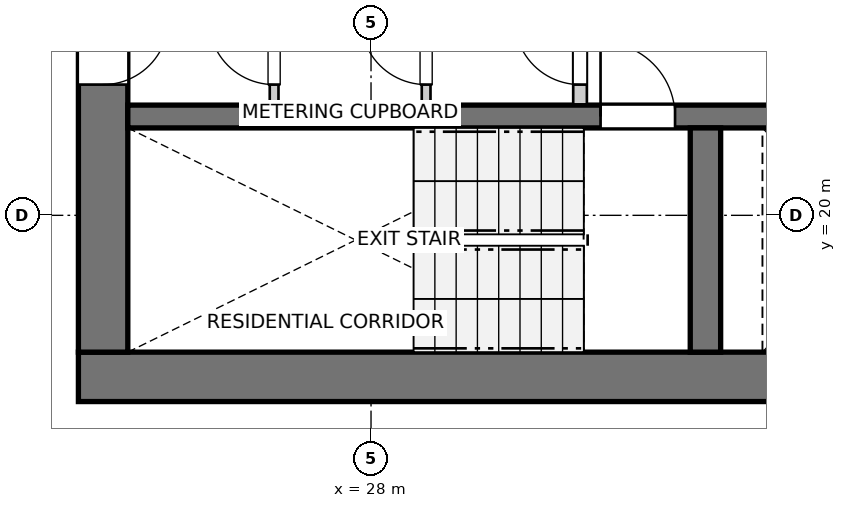
"""IFC4 building model, lengths in metres.
Left out: names, types, materials, properties, quantities, classifications, styles, units other than length and angle.
Written with IfcOpenShell. Run it as: python <this file> out.ifc"""

import sys

from ifc_helpers import new_model, si_unit, direction, frame, frame_2d, origin, place, context, subcontext, project, spatial, rectangle, extrude, source, transform, mapped, element, fill, save


model = new_model("IFC4")
c1 = context("Model", 3, precision=1e-05, world=origin(), true_north=direction((0.0, 1.0)))
c2 = subcontext(c1, "Body", "Model", "MODEL_VIEW")
j1 = project(units=[si_unit("LENGTHUNIT", "METRE"), si_unit("PLANEANGLEUNIT", "RADIAN")], contexts=[c1])
p1 = place(None, origin())
s1 = spatial("IfcSite", under=j1, at=p1, CompositionType="ELEMENT")
p2 = place(p1, origin())
s2 = spatial("IfcBuilding", under=s1, at=p2, CompositionType="ELEMENT")
p3 = place(p2, frame((0.0, 0.0, 92.8)))
s3 = spatial("IfcBuildingStorey", under=s2, at=p3, CompositionType="ELEMENT", Elevation=92.8)
p4 = place(p3, frame((24.15, 17.875, 0.0), z_axis=(0.0, 0.0, 1.0), x_axis=(1.0, 0.0, 0.0)))
e1 = element("IfcWall", 1, at=p4, inside=s3, PredefinedType="SHEAR", context=c2, shape_type="SweptSolid", body=[
    extrude(rectangle(XDim=12.4, YDim=0.65, at=frame_2d((6.2, 0.0))), origin(), (0.0, 0.0, 1.0), 2.95),
])
p5 = place(p3, frame((24.475, 33.8, 0.0), z_axis=(0.0, 0.0, 1.0), x_axis=(0.0, -1.0, 0.0)))
e2 = element("IfcWall", 2, at=p5, inside=s3, PredefinedType="SHEAR", context=c2, shape_type="SweptSolid", body=[
    extrude(rectangle(XDim=15.6, YDim=0.65, at=frame_2d((7.8, 0.0))), origin(), (0.0, 0.0, 1.0), 2.95),
])
p6 = place(p5, frame((7.05, 0.0, 0.0)))
e3 = element("IfcOpeningElement", 3, at=p6, cuts=e2, PredefinedType="OPENING", context=c2, shape_type="SweptSolid", body=[
    extrude(rectangle(XDim=1.5, YDim=2.15, at=frame_2d((0.75, 1.075))), frame((0.0, 0.335, 0.0), z_axis=(0.0, -1.0, 0.0), x_axis=(1.0, 0.0, 0.0)), (0.0, 0.0, 1.0), 0.67),
])
p7 = place(p5, frame((3.52, 0.0, 0.0)))
e4 = element("IfcOpeningElement", 4, at=p7, cuts=e2, PredefinedType="OPENING", context=c2, shape_type="SweptSolid", body=[
    extrude(rectangle(XDim=0.86, YDim=2.05, at=frame_2d((0.43, 1.025))), frame((0.0, 0.335, 0.0), z_axis=(0.0, -1.0, 0.0), x_axis=(1.0, 0.0, 0.0)), (0.0, 0.0, 1.0), 0.67),
])
p8 = place(p5, frame((11.22, 0.0, 0.0)))
e5 = element("IfcOpeningElement", 5, at=p8, cuts=e2, PredefinedType="OPENING", context=c2, shape_type="SweptSolid", body=[
    extrude(rectangle(XDim=0.86, YDim=2.05, at=frame_2d((0.43, 1.025))), frame((0.0, 0.335, 0.0), z_axis=(0.0, -1.0, 0.0), x_axis=(1.0, 0.0, 0.0)), (0.0, 0.0, 1.0), 0.67),
])
p9 = place(p3, frame((24.8, 21.3, 0.0), z_axis=(0.0, 0.0, 1.0), x_axis=(1.0, 0.0, 0.0)))
e6 = element("IfcWall", 6, at=p9, inside=s3, PredefinedType="SHEAR", context=c2, shape_type="SweptSolid", body=[
    extrude(rectangle(XDim=11.1, YDim=0.3, at=frame_2d((5.55, 0.0))), origin(), (0.0, 0.0, 1.0), 2.95),
])
p10 = place(p9, frame((6.22, 0.0, 0.0)))
e7 = element("IfcOpeningElement", 7, at=p10, cuts=e6, PredefinedType="OPENING", context=c2, shape_type="SweptSolid", body=[
    extrude(rectangle(XDim=0.98, YDim=2.15, at=frame_2d((0.49, 1.075))), frame((0.0, 0.16, 0.0), z_axis=(0.0, -1.0, 0.0), x_axis=(1.0, 0.0, 0.0)), (0.0, 0.0, 1.0), 0.32),
])
p11 = place(p9, frame((9.15, 0.0, 0.0)))
e8 = element("IfcOpeningElement", 8, at=p11, cuts=e6, PredefinedType="OPENING", context=c2, shape_type="SweptSolid", body=[
    extrude(rectangle(XDim=1.15, YDim=2.15, at=frame_2d((0.575, 1.075))), frame((0.0, 0.16, 0.0), z_axis=(0.0, -1.0, 0.0), x_axis=(1.0, 0.0, 0.0)), (0.0, 0.0, 1.0), 0.32),
])
p12 = place(p3, frame((32.4, 18.2, 0.0), z_axis=(0.0, 0.0, 1.0), x_axis=(0.0, 1.0, 0.0)))
e9 = element("IfcWall", 9, at=p12, inside=s3, PredefinedType="SHEAR", context=c2, shape_type="SweptSolid", body=[
    extrude(rectangle(XDim=2.95, YDim=0.4, at=frame_2d((1.475, 0.0))), origin(), (0.0, 0.0, 1.0), 2.95),
])
p13 = place(p3, frame((30.75, 21.46, 0.0), z_axis=(0.0, 0.0, 1.0), x_axis=(0.0, 1.0, 0.0)))
e10 = element("IfcWall", 10, at=p13, inside=s3, PredefinedType="PARTITIONING", context=c2, shape_type="SweptSolid", body=[
    extrude(rectangle(XDim=3.11, YDim=0.18, at=frame_2d((1.555, 0.0))), origin(), (0.0, 0.0, 1.0), 2.95),
])
p14 = place(p13, frame((0.26, 0.0, 0.0)))
e11 = element("IfcOpeningElement", 11, at=p14, cuts=e10, PredefinedType="OPENING", context=c2, shape_type="SweptSolid", body=[
    extrude(rectangle(XDim=0.86, YDim=2.05, at=frame_2d((0.43, 1.025))), frame((0.0, 0.1, 0.0), z_axis=(0.0, -1.0, 0.0), x_axis=(1.0, 0.0, 0.0)), (0.0, 0.0, 1.0), 0.2),
])
p15 = place(p3, frame((26.725, 21.46, 0.0), z_axis=(0.0, 0.0, 1.0), x_axis=(0.0, 1.0, 0.0)))
e12 = element("IfcWall", 12, at=p15, inside=s3, PredefinedType="PARTITIONING", context=c2, shape_type="SweptSolid", body=[
    extrude(rectangle(XDim=1.38, YDim=0.115, at=frame_2d((0.69, 0.0))), origin(), (0.0, 0.0, 1.0), 2.95),
])
p16 = place(p15, frame((0.26, 0.0, 0.0)))
e13 = element("IfcOpeningElement", 13, at=p16, cuts=e12, PredefinedType="OPENING", context=c2, shape_type="SweptSolid", body=[
    extrude(rectangle(XDim=0.86, YDim=2.05, at=frame_2d((0.43, 1.025))), frame((0.0, 0.067, 0.0), z_axis=(0.0, -1.0, 0.0), x_axis=(1.0, 0.0, 0.0)), (0.0, 0.0, 1.0), 0.135),
])
p17 = place(p3, frame((28.725, 21.46, 0.0), z_axis=(0.0, 0.0, 1.0), x_axis=(0.0, 1.0, 0.0)))
e14 = element("IfcWall", 14, at=p17, inside=s3, PredefinedType="PARTITIONING", context=c2, shape_type="SweptSolid", body=[
    extrude(rectangle(XDim=1.38, YDim=0.115, at=frame_2d((0.69, 0.0))), origin(), (0.0, 0.0, 1.0), 2.95),
])
p18 = place(p17, frame((0.26, 0.0, 0.0)))
e15 = element("IfcOpeningElement", 15, at=p18, cuts=e14, PredefinedType="OPENING", context=c2, shape_type="SweptSolid", body=[
    extrude(rectangle(XDim=0.86, YDim=2.05, at=frame_2d((0.43, 1.025))), frame((0.0, 0.067, 0.0), z_axis=(0.0, -1.0, 0.0), x_axis=(1.0, 0.0, 0.0)), (0.0, 0.0, 1.0), 0.135),
])
m1 = source(origin(), c2, "Body", "SweptSolid", [
    extrude(rectangle(XDim=0.98, YDim=2.15, at=frame_2d((0.49, 1.075))), frame((0.0, 0.025, 0.0), z_axis=(0.0, -1.0, 0.0), x_axis=(1.0, 0.0, 0.0)), (0.0, 0.0, 1.0), 0.05),
])
p19 = place(p10, origin())
e16 = element("IfcDoor", 16, at=p19, inside=s3, OperationType="SINGLE_SWING_LEFT", PredefinedType="DOOR", context=c2, shape_type="MappedRepresentation", body=[
    mapped(m1, transform((0.0, 0.0, 0.0), x_axis=(1.0, 0.0, 0.0), y_axis=(0.0, 1.0, 0.0), z_axis=(0.0, 0.0, 1.0), scale=1.0)),
])
fill(e7, e16)
m2 = source(origin(), c2, "Body", "SweptSolid", [
    extrude(rectangle(XDim=0.86, YDim=2.05, at=frame_2d((0.43, 1.025))), frame((0.0, 0.025, 0.0), z_axis=(0.0, -1.0, 0.0), x_axis=(1.0, 0.0, 0.0)), (0.0, 0.0, 1.0), 0.05),
])
p20 = place(p8, origin())
e17 = element("IfcDoor", 17, at=p20, inside=s3, OperationType="SINGLE_SWING_LEFT", PredefinedType="DOOR", context=c2, shape_type="MappedRepresentation", body=[
    mapped(m2, transform((0.0, 0.0, 0.0), x_axis=(1.0, 0.0, 0.0), y_axis=(0.0, 1.0, 0.0), z_axis=(0.0, 0.0, 1.0), scale=1.0)),
])
fill(e5, e17)
p21 = place(p14, origin())
e18 = element("IfcDoor", 18, at=p21, inside=s3, OperationType="SINGLE_SWING_RIGHT", PredefinedType="DOOR", context=c2, shape_type="MappedRepresentation", body=[
    mapped(m2, transform((0.0, 0.0, 0.0), x_axis=(1.0, 0.0, 0.0), y_axis=(0.0, 1.0, 0.0), z_axis=(0.0, 0.0, 1.0), scale=1.0)),
])
fill(e11, e18)
p22 = place(p16, origin())
e19 = element("IfcDoor", 19, at=p22, inside=s3, OperationType="SINGLE_SWING_RIGHT", PredefinedType="DOOR", context=c2, shape_type="MappedRepresentation", body=[
    mapped(m2, transform((0.0, 0.0, 0.0), x_axis=(1.0, 0.0, 0.0), y_axis=(0.0, 1.0, 0.0), z_axis=(0.0, 0.0, 1.0), scale=1.0)),
])
fill(e13, e19)
p23 = place(p18, origin())
e20 = element("IfcDoor", 20, at=p23, inside=s3, OperationType="SINGLE_SWING_RIGHT", PredefinedType="DOOR", context=c2, shape_type="MappedRepresentation", body=[
    mapped(m2, transform((0.0, 0.0, 0.0), x_axis=(1.0, 0.0, 0.0), y_axis=(0.0, 1.0, 0.0), z_axis=(0.0, 0.0, 1.0), scale=1.0)),
])
fill(e15, e20)
save(model, sys.argv[1])
